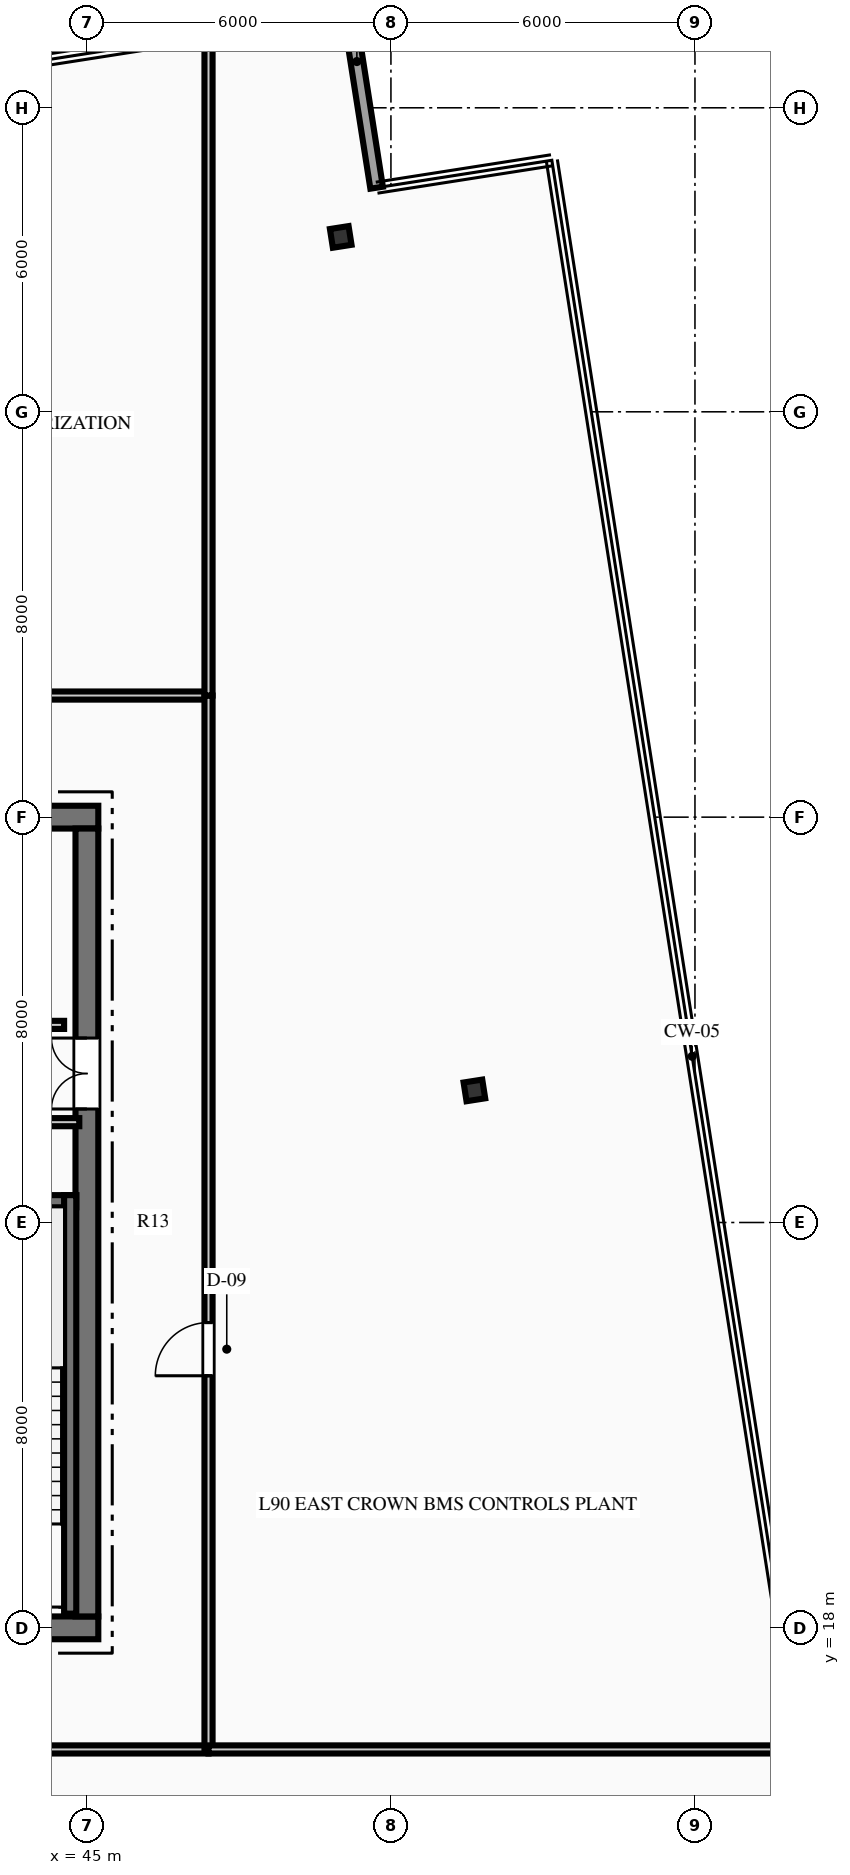
"""IFC4 building model, lengths in metres.
Left out: names, types, materials, properties, quantities, classifications, styles, units other than length and angle.
Written with IfcOpenShell. Run it as: python <this file> out.ifc"""

import sys

from ifc_helpers import new_model, si_unit, direction, frame, frame_2d, origin, origin_2d, place, context, subcontext, project, spatial, rectangle, i_section, extrude, element, fill, save


model = new_model("IFC4")
c1 = context("Model", 3, precision=1e-05, world=origin(), true_north=direction((0.0, 1.0)))
c2 = subcontext(c1, "Body", "Model", "MODEL_VIEW")
j1 = project(units=[si_unit("LENGTHUNIT", "METRE"), si_unit("PLANEANGLEUNIT", "RADIAN")], contexts=[c1])
p1 = place(None, origin())
s1 = spatial("IfcSite", under=j1, at=p1, CompositionType="ELEMENT")
p2 = place(p1, origin())
s2 = spatial("IfcBuilding", under=s1, at=p2, CompositionType="ELEMENT")
p3 = place(p2, frame((0.0, 0.0, 356.4)))
s3 = spatial("IfcBuildingStorey", under=s2, at=p3, CompositionType="ELEMENT", Elevation=356.4)
p4 = place(p3, frame((26.775, 18.0, 0.0), z_axis=(0.0, 0.0, 1.0), x_axis=(1.0, 0.0, 0.0)))
e1 = element("IfcWall", 1, at=p4, inside=s3, PredefinedType="SHEAR", context=c2, shape_type="SweptSolid", body=[
    extrude(rectangle(XDim=18.45, YDim=0.45, at=frame_2d((9.225, 0.0))), origin(), (0.0, 0.0, 1.0), 4.2),
])
p5 = place(p4, frame((7.325, 0.0, 0.0)))
e2 = element("IfcOpeningElement", 2, at=p5, cuts=e1, PredefinedType="OPENING", context=c2, shape_type="SweptSolid", body=[
    extrude(rectangle(XDim=1.1, YDim=2.15, at=frame_2d((0.55, 1.075))), frame((0.0, 0.235, 0.0), z_axis=(0.0, -1.0, 0.0), x_axis=(1.0, 0.0, 0.0)), (0.0, 0.0, 1.0), 0.47),
])
p6 = place(p4, frame((10.025, 0.0, 0.0)))
e3 = element("IfcOpeningElement", 3, at=p6, cuts=e1, PredefinedType="OPENING", context=c2, shape_type="SweptSolid", body=[
    extrude(rectangle(XDim=1.1, YDim=2.15, at=frame_2d((0.55, 1.075))), frame((0.0, 0.235, 0.0), z_axis=(0.0, -1.0, 0.0), x_axis=(1.0, 0.0, 0.0)), (0.0, 0.0, 1.0), 0.47),
])
p7 = place(p3, frame((26.775, 34.0, 0.0), z_axis=(0.0, 0.0, 1.0), x_axis=(1.0, 0.0, 0.0)))
e4 = element("IfcWall", 4, at=p7, inside=s3, PredefinedType="SHEAR", context=c2, shape_type="SweptSolid", body=[
    extrude(rectangle(XDim=18.45, YDim=0.45, at=frame_2d((9.225, 0.0))), origin(), (0.0, 0.0, 1.0), 4.2),
])
p8 = place(p3, frame((45.0, 18.225, 0.0), z_axis=(0.0, 0.0, 1.0), x_axis=(0.0, 1.0, 0.0)))
e5 = element("IfcWall", 5, at=p8, inside=s3, PredefinedType="SHEAR", context=c2, shape_type="SweptSolid", body=[
    extrude(rectangle(XDim=15.55, YDim=0.45, at=frame_2d((7.775, 0.0))), origin(), (0.0, 0.0, 1.0), 4.2),
])
p9 = place(p8, frame((10.015, 0.0, 0.0)))
e6 = element("IfcOpeningElement", 6, at=p9, cuts=e5, PredefinedType="OPENING", context=c2, shape_type="SweptSolid", body=[
    extrude(rectangle(XDim=1.4, YDim=2.2, at=frame_2d((0.7, 1.1))), frame((0.0, 0.235, 0.0), z_axis=(0.0, -1.0, 0.0), x_axis=(1.0, 0.0, 0.0)), (0.0, 0.0, 1.0), 0.47),
])
p10 = place(p3, frame((40.81, 26.42, 0.0), z_axis=(0.0, 0.0, 1.0), x_axis=(1.0, 0.0, 0.0)))
e7 = element("IfcWall", 7, at=p10, inside=s3, PredefinedType="SHEAR", context=c2, shape_type="SweptSolid", body=[
    extrude(rectangle(XDim=3.98, YDim=0.24, at=frame_2d((1.99, 0.0))), origin(), (0.0, 0.0, 1.0), 4.2),
])
p11 = place(p3, frame((44.67, 18.28, 0.0), z_axis=(0.0, 0.0, 1.0), x_axis=(0.0, 1.0, 0.0)))
e8 = element("IfcWall", 8, at=p11, inside=s3, PredefinedType="SHEAR", context=c2, shape_type="SweptSolid", body=[
    extrude(rectangle(XDim=8.26, YDim=0.24, at=frame_2d((4.13, 0.0))), origin(), (0.0, 0.0, 1.0), 4.2),
])
for number, where, z_axis, x_axis in (
    (9, (52.647, 28.607, 0.0), (0.0, 0.0, 1.0), (-0.155, 0.988, 0.0)),
    (10, (50.009, 45.452, 0.0), (0.0, 0.0, 1.0), (-0.155, 0.988, 0.0)),
):
    element("IfcColumn", number, at=place(p3, frame(where, z_axis=z_axis, x_axis=x_axis)), inside=s3, PredefinedType="COLUMN", context=c2, shape_type="SweptSolid", body=[
        extrude(i_section(OverallWidth=0.374, OverallDepth=0.373, WebThickness=0.016, FlangeThickness=0.026, at=origin_2d()), origin(), (0.0, 0.0, 1.0), 4.2),
    ])
p12 = place(p3, frame((50.176, 49.881, 0.0), z_axis=(0.0, 0.0, 1.0), x_axis=(0.154719468176, -0.987958443543, 0.0)))
e11 = element("IfcWall", 11, at=p12, inside=s3, PredefinedType="STANDARD", context=c2, shape_type="SweptSolid", body=[
    extrude(rectangle(XDim=3.5, YDim=0.25, at=frame_2d((1.75, 0.0))), origin(), (0.0, 0.0, 1.0), 3.93),
])
p13 = place(p3, frame((40.8, 27.98, 0.0), z_axis=(0.0, 0.0, 1.0), x_axis=(1.0, 0.0, 0.0)))
e12 = element("IfcWall", 12, at=p13, inside=s3, PredefinedType="PARTITIONING", context=c2, shape_type="SweptSolid", body=[
    extrude(rectangle(XDim=4.05, YDim=0.16, at=frame_2d((2.025, 0.0))), origin(), (0.0, 0.0, 1.0), 3.93),
])
p14 = place(p13, frame((1.475, 0.0, 0.0)))
e13 = element("IfcOpeningElement", 13, at=p14, cuts=e12, PredefinedType="OPENING", context=c2, shape_type="SweptSolid", body=[
    extrude(rectangle(XDim=0.95, YDim=2.15, at=frame_2d((0.475, 1.075))), frame((0.0, 0.09, 0.0), z_axis=(0.0, -1.0, 0.0), x_axis=(1.0, 0.0, 0.0)), (0.0, 0.0, 1.0), 0.18),
])
p15 = place(p3, frame((40.12, 29.9, 0.0), z_axis=(0.0, 0.0, 1.0), x_axis=(1.0, 0.0, 0.0)))
e14 = element("IfcWall", 14, at=p15, inside=s3, PredefinedType="PARTITIONING", context=c2, shape_type="SweptSolid", body=[
    extrude(rectangle(XDim=4.43, YDim=0.16, at=frame_2d((2.215, 0.0))), origin(), (0.0, 0.0, 1.0), 3.93),
])
p16 = place(p15, frame((1.755, 0.0, 0.0)))
e15 = element("IfcOpeningElement", 15, at=p16, cuts=e14, PredefinedType="OPENING", context=c2, shape_type="SweptSolid", body=[
    extrude(rectangle(XDim=0.95, YDim=2.15, at=frame_2d((0.475, 1.075))), frame((0.0, 0.09, 0.0), z_axis=(0.0, -1.0, 0.0), x_axis=(1.0, 0.0, 0.0)), (0.0, 0.0, 1.0), 0.18),
])
p17 = place(p3, frame((24.6, 15.6, 0.0), z_axis=(0.0, 0.0, 1.0), x_axis=(1.0, 0.0, 0.0)))
e16 = element("IfcWall", 16, at=p17, inside=s3, PredefinedType="PARTITIONING", context=c2, shape_type="SweptSolid", body=[
    extrude(rectangle(XDim=22.8, YDim=0.16, at=frame_2d((11.4, 0.0))), origin(), (0.0, 0.0, 1.0), 3.93),
])
p18 = place(p17, frame((6.875, 0.0, 0.0)))
e17 = element("IfcOpeningElement", 17, at=p18, cuts=e16, PredefinedType="OPENING", context=c2, shape_type="SweptSolid", body=[
    extrude(rectangle(XDim=1.05, YDim=2.15, at=frame_2d((0.525, 1.075))), frame((0.0, 0.09, 0.0), z_axis=(0.0, -1.0, 0.0), x_axis=(1.0, 0.0, 0.0)), (0.0, 0.0, 1.0), 0.18),
])
p19 = place(p17, frame((14.875, 0.0, 0.0)))
e18 = element("IfcOpeningElement", 18, at=p19, cuts=e16, PredefinedType="OPENING", context=c2, shape_type="SweptSolid", body=[
    extrude(rectangle(XDim=1.05, YDim=2.15, at=frame_2d((0.525, 1.075))), frame((0.0, 0.09, 0.0), z_axis=(0.0, -1.0, 0.0), x_axis=(1.0, 0.0, 0.0)), (0.0, 0.0, 1.0), 0.18),
])
p20 = place(p3, frame((24.6, 36.4, 0.0), z_axis=(0.0, 0.0, 1.0), x_axis=(1.0, 0.0, 0.0)))
e19 = element("IfcWall", 19, at=p20, inside=s3, PredefinedType="PARTITIONING", context=c2, shape_type="SweptSolid", body=[
    extrude(rectangle(XDim=22.8, YDim=0.16, at=frame_2d((11.4, 0.0))), origin(), (0.0, 0.0, 1.0), 3.93),
])
p21 = place(p20, frame((6.875, 0.0, 0.0)))
e20 = element("IfcOpeningElement", 20, at=p21, cuts=e19, PredefinedType="OPENING", context=c2, shape_type="SweptSolid", body=[
    extrude(rectangle(XDim=1.05, YDim=2.15, at=frame_2d((0.525, 1.075))), frame((0.0, 0.09, 0.0), z_axis=(0.0, -1.0, 0.0), x_axis=(1.0, 0.0, 0.0)), (0.0, 0.0, 1.0), 0.18),
])
p22 = place(p20, frame((14.875, 0.0, 0.0)))
e21 = element("IfcOpeningElement", 21, at=p22, cuts=e19, PredefinedType="OPENING", context=c2, shape_type="SweptSolid", body=[
    extrude(rectangle(XDim=1.05, YDim=2.15, at=frame_2d((0.525, 1.075))), frame((0.0, 0.09, 0.0), z_axis=(0.0, -1.0, 0.0), x_axis=(1.0, 0.0, 0.0)), (0.0, 0.0, 1.0), 0.18),
])
p23 = place(p3, frame((47.4, 15.6, 0.0), z_axis=(0.0, 0.0, 1.0), x_axis=(0.0, 1.0, 0.0)))
e22 = element("IfcWall", 22, at=p23, inside=s3, PredefinedType="PARTITIONING", context=c2, shape_type="SweptSolid", body=[
    extrude(rectangle(XDim=20.8, YDim=0.16, at=frame_2d((10.4, 0.0))), origin(), (0.0, 0.0, 1.0), 3.93),
])
p24 = place(p23, frame((7.375, 0.0, 0.0)))
e23 = element("IfcOpeningElement", 23, at=p24, cuts=e22, PredefinedType="OPENING", context=c2, shape_type="SweptSolid", body=[
    extrude(rectangle(XDim=1.05, YDim=2.15, at=frame_2d((0.525, 1.075))), frame((0.0, 0.09, 0.0), z_axis=(0.0, -1.0, 0.0), x_axis=(1.0, 0.0, 0.0)), (0.0, 0.0, 1.0), 0.18),
])
p25 = place(p3, frame((47.4, 15.6, 0.0), z_axis=(0.0, 0.0, 1.0), x_axis=(1.0, 0.0, 0.0)))
e24 = element("IfcWall", 24, at=p25, inside=s3, PredefinedType="PARTITIONING", context=c2, shape_type="SweptSolid", body=[
    extrude(rectangle(XDim=11.646, YDim=0.16, at=frame_2d((5.823, 0.0))), origin(), (0.0, 0.0, 1.0), 3.93),
])
p26 = place(p3, frame((47.4, 36.4, 0.0), z_axis=(0.0, 0.0, 1.0), x_axis=(0.0, 1.0, 0.0)))
e25 = element("IfcWall", 25, at=p26, inside=s3, PredefinedType="PARTITIONING", context=c2, shape_type="SweptSolid", body=[
    extrude(rectangle(XDim=13.006, YDim=0.16, at=frame_2d((6.503, 0.0))), origin(), (0.0, 0.0, 1.0), 3.93),
])
p27 = place(p9, origin())
e26 = element("IfcDoor", 26, at=p27, inside=s3, OperationType="DOUBLE_DOOR_SINGLE_SWING", PredefinedType="DOOR", context=c2, shape_type="SweptSolid", body=[
    extrude(rectangle(XDim=1.4, YDim=2.2, at=frame_2d((0.7, 1.1))), frame((0.0, 0.025, 0.0), z_axis=(0.0, -1.0, 0.0), x_axis=(1.0, 0.0, 0.0)), (0.0, 0.0, 1.0), 0.05),
])
fill(e6, e26)
p28 = place(p24, origin())
e27 = element("IfcDoor", 27, at=p28, inside=s3, OperationType="SINGLE_SWING_LEFT", PredefinedType="DOOR", context=c2, shape_type="SweptSolid", body=[
    extrude(rectangle(XDim=1.05, YDim=2.15, at=frame_2d((0.525, 1.075))), frame((0.0, 0.025, 0.0), z_axis=(0.0, -1.0, 0.0), x_axis=(1.0, 0.0, 0.0)), (0.0, 0.0, 1.0), 0.05),
])
fill(e23, e27)
save(model, sys.argv[1])
